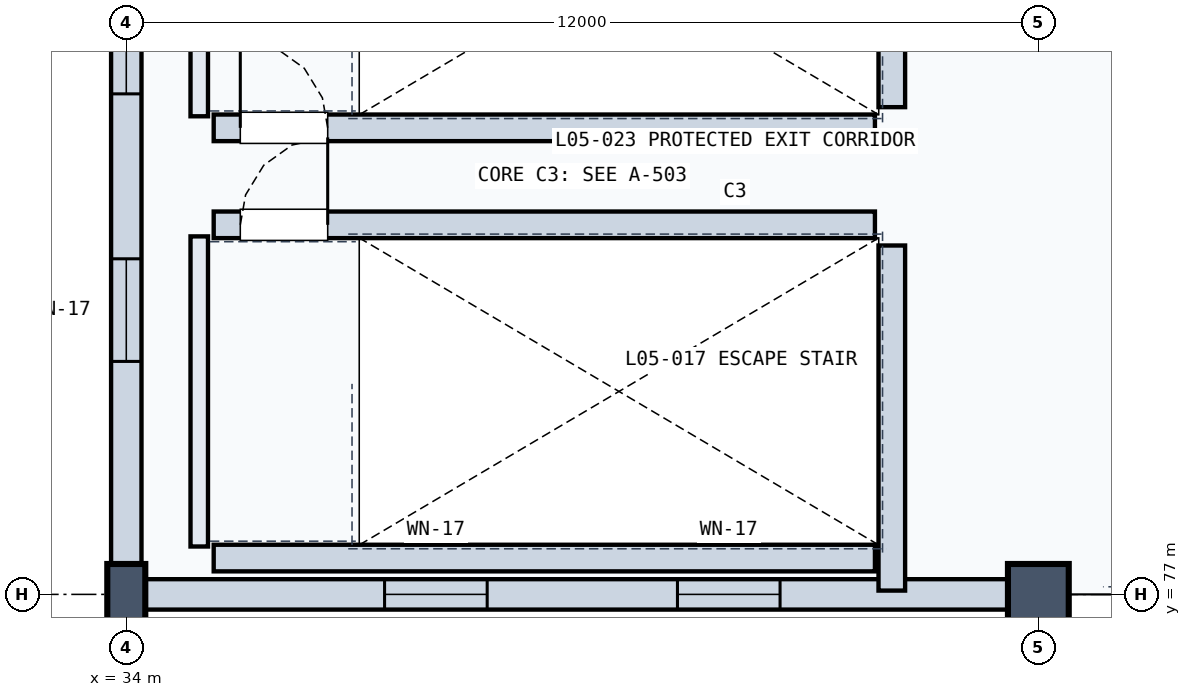
"""IFC4 building model, lengths in metres.
Left out: names, types, materials, properties, quantities, classifications, styles, units other than length and angle.
Written with IfcOpenShell. Run it as: python <this file> out.ifc"""

import sys

from ifc_helpers import new_model, si_unit, direction, frame, frame_2d, origin, origin_2d, place, context, subcontext, project, spatial, rectangle, extrude, element, fill, save


model = new_model("IFC4")
c1 = context("Model", 3, precision=1e-05, world=origin(), true_north=direction((0.0, 1.0)))
c2 = subcontext(c1, "Body", "Model", "MODEL_VIEW")
j1 = project(units=[si_unit("LENGTHUNIT", "METRE"), si_unit("PLANEANGLEUNIT", "RADIAN")], contexts=[c1])
p1 = place(None, origin())
s1 = spatial("IfcSite", under=j1, at=p1, CompositionType="ELEMENT")
p2 = place(p1, origin())
s2 = spatial("IfcBuilding", under=s1, at=p2, CompositionType="ELEMENT")
p3 = place(p2, frame((0.0, 0.0, 24.3)))
s3 = spatial("IfcBuildingStorey", under=s2, at=p3, CompositionType="ELEMENT", Elevation=24.3)
p4 = place(p3, frame((34.0, 77.0, 0.0), z_axis=(0.0, 0.0, 1.0), x_axis=(1.0, 0.0, 0.0)))
e1 = element("IfcColumn", 1, at=p4, inside=s3, PredefinedType="COLUMN", context=c2, shape_type="SweptSolid", body=[
    extrude(rectangle(XDim=0.5, YDim=0.8, at=origin_2d()), origin(), (0.0, 0.0, 1.0), 5.4),
])
p5 = place(p3, frame((46.0, 77.0, 0.0), z_axis=(0.0, 0.0, 1.0), x_axis=(1.0, 0.0, 0.0)))
e2 = element("IfcColumn", 2, at=p5, inside=s3, PredefinedType="COLUMN", context=c2, shape_type="SweptSolid", body=[
    extrude(rectangle(XDim=0.8, YDim=0.8, at=origin_2d()), origin(), (0.0, 0.0, 1.0), 5.4),
])
p6 = place(p3, frame((34.22, 77.0, 0.0), z_axis=(0.0, 0.0, 1.0), x_axis=(1.0, 0.0, 0.0)))
e3 = element("IfcWall", 3, at=p6, inside=s3, PredefinedType="SOLIDWALL", context=c2, shape_type="SweptSolid", body=[
    extrude(rectangle(XDim=11.56, YDim=0.4, at=frame_2d((5.78, 0.0))), origin(), (0.0, 0.0, 1.0), 5.185),
])
p7 = place(p6, frame((3.178, 0.0, 0.8)))
e4 = element("IfcOpeningElement", 4, at=p7, cuts=e3, PredefinedType="OPENING", context=c2, shape_type="SweptSolid", body=[
    extrude(rectangle(XDim=1.35, YDim=2.1, at=frame_2d((0.675, 1.05))), frame((0.0, 0.21, 0.0), z_axis=(0.0, -1.0, 0.0), x_axis=(1.0, 0.0, 0.0)), (0.0, 0.0, 1.0), 0.42),
])
p8 = place(p6, frame((7.032, 0.0, 0.8)))
e5 = element("IfcOpeningElement", 5, at=p8, cuts=e3, PredefinedType="OPENING", context=c2, shape_type="SweptSolid", body=[
    extrude(rectangle(XDim=1.35, YDim=2.1, at=frame_2d((0.675, 1.05))), frame((0.0, 0.21, 0.0), z_axis=(0.0, -1.0, 0.0), x_axis=(1.0, 0.0, 0.0)), (0.0, 0.0, 1.0), 0.42),
])
p9 = place(p3, frame((34.0, 77.22, 0.0), z_axis=(0.0, 0.0, 1.0), x_axis=(0.0, 1.0, 0.0)))
e6 = element("IfcWall", 6, at=p9, inside=s3, PredefinedType="SOLIDWALL", context=c2, shape_type="SweptSolid", body=[
    extrude(rectangle(XDim=10.56, YDim=0.4, at=frame_2d((5.28, 0.0))), origin(), (0.0, 0.0, 1.0), 5.185),
])
p10 = place(p9, frame((2.845, 0.0, 0.8)))
e7 = element("IfcOpeningElement", 7, at=p10, cuts=e6, PredefinedType="OPENING", context=c2, shape_type="SweptSolid", body=[
    extrude(rectangle(XDim=1.35, YDim=2.1, at=frame_2d((0.675, 1.05))), frame((0.0, 0.21, 0.0), z_axis=(0.0, -1.0, 0.0), x_axis=(1.0, 0.0, 0.0)), (0.0, 0.0, 1.0), 0.42),
])
p11 = place(p9, frame((6.365, 0.0, 0.8)))
e8 = element("IfcOpeningElement", 8, at=p11, cuts=e6, PredefinedType="OPENING", context=c2, shape_type="SweptSolid", body=[
    extrude(rectangle(XDim=1.35, YDim=2.1, at=frame_2d((0.675, 1.05))), frame((0.0, 0.21, 0.0), z_axis=(0.0, -1.0, 0.0), x_axis=(1.0, 0.0, 0.0)), (0.0, 0.0, 1.0), 0.42),
])
p12 = place(p3, frame((34.96, 77.63, 0.0), z_axis=(0.0, 0.0, 1.0), x_axis=(0.0, 1.0, 0.0)))
e9 = element("IfcWall", 9, at=p12, inside=s3, PredefinedType="SOLIDWALL", context=c2, shape_type="SweptSolid", body=[
    extrude(rectangle(XDim=4.08, YDim=0.23, at=frame_2d((2.04, 0.0))), origin(), (0.0, 0.0, 1.0), 5.18),
])
p13 = place(p3, frame((44.072, 77.05, 0.0), z_axis=(0.0, 0.0, 1.0), x_axis=(0.0, 1.0, 0.0)))
e10 = element("IfcWall", 10, at=p13, inside=s3, PredefinedType="SOLIDWALL", context=c2, shape_type="SweptSolid", body=[
    extrude(rectangle(XDim=4.54, YDim=0.35, at=frame_2d((2.27, 0.0))), origin(), (0.0, 0.0, 1.0), 5.18),
])
p14 = place(p3, frame((35.15, 77.478, 0.0), z_axis=(0.0, 0.0, 1.0), x_axis=(1.0, 0.0, 0.0)))
e11 = element("IfcWall", 11, at=p14, inside=s3, PredefinedType="SOLIDWALL", context=c2, shape_type="SweptSolid", body=[
    extrude(rectangle(XDim=8.7, YDim=0.35, at=frame_2d((4.35, 0.0))), origin(), (0.0, 0.0, 1.0), 5.18),
])
p15 = place(p3, frame((35.15, 81.862, 0.0), z_axis=(0.0, 0.0, 1.0), x_axis=(1.0, 0.0, 0.0)))
e12 = element("IfcWall", 12, at=p15, inside=s3, PredefinedType="SOLIDWALL", context=c2, shape_type="SweptSolid", body=[
    extrude(rectangle(XDim=8.7, YDim=0.35, at=frame_2d((4.35, 0.0))), origin(), (0.0, 0.0, 1.0), 5.18),
])
p16 = place(p15, frame((0.35, 0.0, 0.0)))
e13 = element("IfcOpeningElement", 13, at=p16, cuts=e12, PredefinedType="OPENING", context=c2, shape_type="SweptSolid", body=[
    extrude(rectangle(XDim=1.15, YDim=2.2, at=frame_2d((0.575, 1.1))), frame((0.0, 0.185, 0.0), z_axis=(0.0, -1.0, 0.0), x_axis=(1.0, 0.0, 0.0)), (0.0, 0.0, 1.0), 0.37),
])
p17 = place(p3, frame((34.96, 83.29, 0.0), z_axis=(0.0, 0.0, 1.0), x_axis=(0.0, 1.0, 0.0)))
e14 = element("IfcWall", 14, at=p17, inside=s3, PredefinedType="SOLIDWALL", context=c2, shape_type="SweptSolid", body=[
    extrude(rectangle(XDim=4.08, YDim=0.23, at=frame_2d((2.04, 0.0))), origin(), (0.0, 0.0, 1.0), 5.18),
])
p18 = place(p3, frame((44.072, 83.41, 0.0), z_axis=(0.0, 0.0, 1.0), x_axis=(0.0, 1.0, 0.0)))
e15 = element("IfcWall", 15, at=p18, inside=s3, PredefinedType="SOLIDWALL", context=c2, shape_type="SweptSolid", body=[
    extrude(rectangle(XDim=3.84, YDim=0.35, at=frame_2d((1.92, 0.0))), origin(), (0.0, 0.0, 1.0), 5.18),
])
p19 = place(p3, frame((35.15, 83.138, 0.0), z_axis=(0.0, 0.0, 1.0), x_axis=(1.0, 0.0, 0.0)))
e16 = element("IfcWall", 16, at=p19, inside=s3, PredefinedType="SOLIDWALL", context=c2, shape_type="SweptSolid", body=[
    extrude(rectangle(XDim=8.7, YDim=0.35, at=frame_2d((4.35, 0.0))), origin(), (0.0, 0.0, 1.0), 5.18),
])
p20 = place(p19, frame((0.35, 0.0, 0.0)))
e17 = element("IfcOpeningElement", 17, at=p20, cuts=e16, PredefinedType="OPENING", context=c2, shape_type="SweptSolid", body=[
    extrude(rectangle(XDim=1.15, YDim=2.2, at=frame_2d((0.575, 1.1))), frame((0.0, 0.185, 0.0), z_axis=(0.0, -1.0, 0.0), x_axis=(1.0, 0.0, 0.0)), (0.0, 0.0, 1.0), 0.37),
])
p21 = place(p7, origin())
e18 = element("IfcWindow", 18, at=p21, inside=s3, PartitioningType="SINGLE_PANEL", PredefinedType="WINDOW", context=c2, shape_type="SweptSolid", body=[
    extrude(rectangle(XDim=1.35, YDim=2.1, at=frame_2d((0.675, 1.05))), frame((0.0, 0.03, 0.0), z_axis=(0.0, -1.0, 0.0), x_axis=(1.0, 0.0, 0.0)), (0.0, 0.0, 1.0), 0.06),
])
fill(e4, e18)
p22 = place(p8, origin())
e19 = element("IfcWindow", 19, at=p22, inside=s3, PartitioningType="SINGLE_PANEL", PredefinedType="WINDOW", context=c2, shape_type="SweptSolid", body=[
    extrude(rectangle(XDim=1.35, YDim=2.1, at=frame_2d((0.675, 1.05))), frame((0.0, 0.03, 0.0), z_axis=(0.0, -1.0, 0.0), x_axis=(1.0, 0.0, 0.0)), (0.0, 0.0, 1.0), 0.06),
])
fill(e5, e19)
p23 = place(p10, origin())
e20 = element("IfcWindow", 20, at=p23, inside=s3, PartitioningType="SINGLE_PANEL", PredefinedType="WINDOW", context=c2, shape_type="SweptSolid", body=[
    extrude(rectangle(XDim=1.35, YDim=2.1, at=frame_2d((0.675, 1.05))), frame((0.0, 0.03, 0.0), z_axis=(0.0, -1.0, 0.0), x_axis=(1.0, 0.0, 0.0)), (0.0, 0.0, 1.0), 0.06),
])
fill(e7, e20)
p24 = place(p11, origin())
e21 = element("IfcWindow", 21, at=p24, inside=s3, PartitioningType="SINGLE_PANEL", PredefinedType="WINDOW", context=c2, shape_type="SweptSolid", body=[
    extrude(rectangle(XDim=1.35, YDim=2.1, at=frame_2d((0.675, 1.05))), frame((0.0, 0.03, 0.0), z_axis=(0.0, -1.0, 0.0), x_axis=(1.0, 0.0, 0.0)), (0.0, 0.0, 1.0), 0.06),
])
fill(e8, e21)
p25 = place(p16, origin())
e22 = element("IfcDoor", 22, at=p25, inside=s3, OperationType="SINGLE_SWING_RIGHT", PredefinedType="DOOR", context=c2, shape_type="SweptSolid", body=[
    extrude(rectangle(XDim=1.15, YDim=2.2, at=frame_2d((0.575, 1.1))), frame((0.0, 0.025, 0.0), z_axis=(0.0, -1.0, 0.0), x_axis=(1.0, 0.0, 0.0)), (0.0, 0.0, 1.0), 0.05),
])
fill(e13, e22)
p26 = place(p20, origin())
e23 = element("IfcDoor", 23, at=p26, inside=s3, OperationType="SINGLE_SWING_LEFT", PredefinedType="DOOR", context=c2, shape_type="SweptSolid", body=[
    extrude(rectangle(XDim=1.15, YDim=2.2, at=frame_2d((0.575, 1.1))), frame((0.0, 0.025, 0.0), z_axis=(0.0, -1.0, 0.0), x_axis=(1.0, 0.0, 0.0)), (0.0, 0.0, 1.0), 0.05),
])
fill(e17, e23)
save(model, sys.argv[1])
